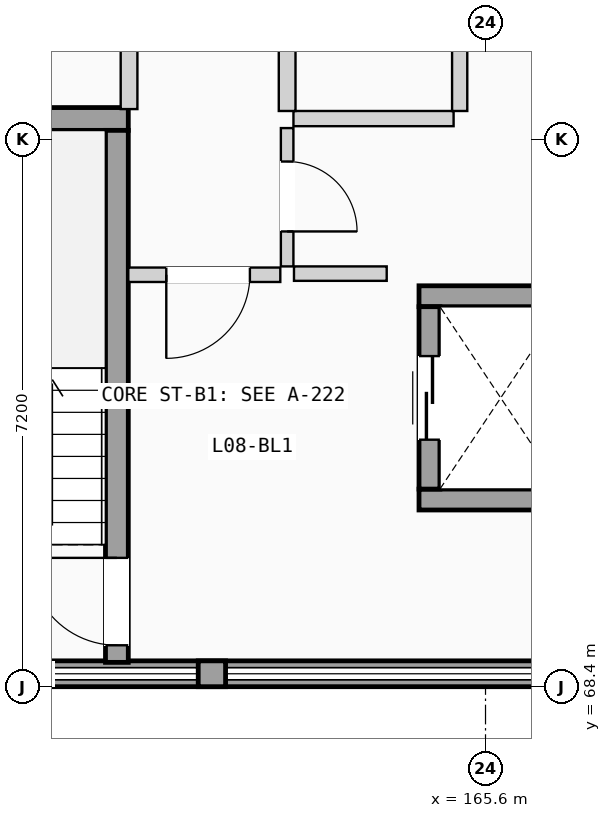
"""IFC4 building model, lengths in metres.
Left out: names, types, materials, properties, quantities, classifications, styles, units other than length and angle.
Written with IfcOpenShell. Run it as: python <this file> out.ifc"""

import sys

from ifc_helpers import new_model, si_unit, direction, frame, frame_2d, origin, place, context, subcontext, project, spatial, rectangle, extrude, element, fill, save


model = new_model("IFC4")
c1 = context("Model", 3, precision=1e-05, world=origin(), true_north=direction((0.0, 1.0)))
c2 = subcontext(c1, "Body", "Model", "MODEL_VIEW")
j1 = project(units=[si_unit("LENGTHUNIT", "METRE"), si_unit("PLANEANGLEUNIT", "RADIAN")], contexts=[c1])
p1 = place(None, origin())
s1 = spatial("IfcSite", under=j1, at=p1, CompositionType="ELEMENT")
p2 = place(p1, origin())
s2 = spatial("IfcBuilding", under=s1, at=p2, CompositionType="ELEMENT")
p3 = place(p2, frame((0.0, 0.0, 27.825)))
s3 = spatial("IfcBuildingStorey", under=s2, at=p3, CompositionType="ELEMENT", Elevation=27.825)
p4 = place(p3, frame((151.2, 68.57, 0.0), z_axis=(0.0, 0.0, 1.0), x_axis=(1.0, 0.0, 0.0)))
e1 = element("IfcWall", 1, at=p4, inside=s3, PredefinedType="SOLIDWALL", context=c2, shape_type="SweptSolid", body=[
    extrude(rectangle(XDim=21.6, YDim=0.34, at=frame_2d((10.8, 0.0))), origin(), (0.0, 0.0, 1.0), 1.11),
])
p5 = place(p3, frame((161.82, 68.57, 1.11), z_axis=(0.0, 0.0, 1.0), x_axis=(1.0, 0.0, 0.0)))
e2 = element("IfcWall", 2, at=p5, inside=s3, PredefinedType="SOLIDWALL", context=c2, shape_type="SweptSolid", body=[
    extrude(rectangle(XDim=0.36, YDim=0.34, at=frame_2d((0.18, 0.0))), origin(), (0.0, 0.0, 1.0), 1.78),
])
p6 = place(p3, frame((156.9, 75.87, 0.0), z_axis=(0.0, 0.0, 1.0), x_axis=(1.0, 0.0, 0.0)))
e3 = element("IfcWall", 3, at=p6, inside=s3, PredefinedType="SHEAR", context=c2, shape_type="SweptSolid", body=[
    extrude(rectangle(XDim=4.0, YDim=0.3, at=frame_2d((2.0, 0.0))), origin(), (0.0, 0.0, 1.0), 2.89),
])
p7 = place(p3, frame((160.75, 68.72, 0.0), z_axis=(0.0, 0.0, 1.0), x_axis=(0.0, 1.0, 0.0)))
e4 = element("IfcWall", 4, at=p7, inside=s3, PredefinedType="SHEAR", context=c2, shape_type="SweptSolid", body=[
    extrude(rectangle(XDim=7.0, YDim=0.3, at=frame_2d((3.5, 0.0))), origin(), (0.0, 0.0, 1.0), 2.89),
])
p8 = place(p7, frame((0.225, 0.0, 0.0)))
e5 = element("IfcOpeningElement", 5, at=p8, cuts=e4, PredefinedType="OPENING", context=c2, shape_type="SweptSolid", body=[
    extrude(rectangle(XDim=1.15, YDim=2.12, at=frame_2d((0.575, 1.06))), frame((0.0, 0.16, 0.0), z_axis=(0.0, -1.0, 0.0), x_axis=(1.0, 0.0, 0.0)), (0.0, 0.0, 1.0), 0.32),
])
for number, where, z_axis, x_axis in (
    (6, (164.725, 70.863, 0.0), (0.0, 0.0, 1.0), (1.0, 0.0, 0.0)),
    (7, (164.725, 73.538, 0.0), (0.0, 0.0, 1.0), (1.0, 0.0, 0.0)),
):
    element("IfcWall", number, at=place(p3, frame(where, z_axis=z_axis, x_axis=x_axis)), inside=s3, PredefinedType="SHEAR", context=c2, shape_type="SweptSolid", body=[
        extrude(rectangle(XDim=2.15, YDim=0.275, at=frame_2d((1.075, 0.0))), origin(), (0.0, 0.0, 1.0), 2.89),
    ])
p9 = place(p3, frame((164.863, 71.0, 0.0), z_axis=(0.0, 0.0, 1.0), x_axis=(0.0, 1.0, 0.0)))
e8 = element("IfcWall", 8, at=p9, inside=s3, PredefinedType="SHEAR", context=c2, shape_type="SweptSolid", body=[
    extrude(rectangle(XDim=2.4, YDim=0.275, at=frame_2d((1.2, 0.0))), origin(), (0.0, 0.0, 1.0), 2.89),
])
p10 = place(p9, frame((0.65, 0.0, 0.0)))
e9 = element("IfcOpeningElement", 9, at=p10, cuts=e8, PredefinedType="OPENING", context=c2, shape_type="SweptSolid", body=[
    extrude(rectangle(XDim=1.1, YDim=2.15, at=frame_2d((0.55, 1.075))), frame((0.0, 0.147, 0.0), z_axis=(0.0, -1.0, 0.0), x_axis=(1.0, 0.0, 0.0)), (0.0, 0.0, 1.0), 0.295),
])
p11 = place(p3, frame((163.08, 73.835, 0.0), z_axis=(0.0, 0.0, 1.0), x_axis=(1.0, 0.0, 0.0)))
e10 = element("IfcWall", 10, at=p11, inside=s3, PredefinedType="PARTITIONING", context=c2, shape_type="SweptSolid", body=[
    extrude(rectangle(XDim=1.22, YDim=0.19, at=frame_2d((0.61, 0.0))), origin(), (0.0, 0.0, 1.0), 2.87),
])
p12 = place(p3, frame((160.9, 73.82, 0.0), z_axis=(0.0, 0.0, 1.0), x_axis=(1.0, 0.0, 0.0)))
e11 = element("IfcWall", 11, at=p12, inside=s3, PredefinedType="PARTITIONING", context=c2, shape_type="SweptSolid", body=[
    extrude(rectangle(XDim=2.0, YDim=0.19, at=frame_2d((1.0, 0.0))), origin(), (0.0, 0.0, 1.0), 2.87),
])
p13 = place(p12, frame((0.5, 0.0, 0.0)))
e12 = element("IfcOpeningElement", 12, at=p13, cuts=e11, PredefinedType="OPENING", context=c2, shape_type="SweptSolid", body=[
    extrude(rectangle(XDim=1.1, YDim=2.12, at=frame_2d((0.55, 1.06))), frame((0.0, 0.105, 0.0), z_axis=(0.0, -1.0, 0.0), x_axis=(1.0, 0.0, 0.0)), (0.0, 0.0, 1.0), 0.21),
])
p14 = place(p3, frame((162.99, 73.93, 0.0), z_axis=(0.0, 0.0, 1.0), x_axis=(0.0, 1.0, 0.0)))
e13 = element("IfcWall", 13, at=p14, inside=s3, PredefinedType="PARTITIONING", context=c2, shape_type="SweptSolid", body=[
    extrude(rectangle(XDim=1.82, YDim=0.165, at=frame_2d((0.91, 0.0))), origin(), (0.0, 0.0, 1.0), 2.87),
])
p15 = place(p14, frame((0.46, 0.0, 0.0)))
e14 = element("IfcOpeningElement", 14, at=p15, cuts=e13, PredefinedType="OPENING", context=c2, shape_type="SweptSolid", body=[
    extrude(rectangle(XDim=0.92, YDim=2.04, at=frame_2d((0.46, 1.02))), frame((0.0, 0.093, 0.0), z_axis=(0.0, -1.0, 0.0), x_axis=(1.0, 0.0, 0.0)), (0.0, 0.0, 1.0), 0.185),
])
p16 = place(p3, frame((163.073, 75.875, 0.0), z_axis=(0.0, 0.0, 1.0), x_axis=(1.0, 0.0, 0.0)))
e15 = element("IfcWall", 15, at=p16, inside=s3, PredefinedType="PLUMBINGWALL", context=c2, shape_type="SweptSolid", body=[
    extrude(rectangle(XDim=2.107, YDim=0.2, at=frame_2d((1.053, 0.0))), origin(), (0.0, 0.0, 1.0), 2.87),
])
p17 = place(p3, frame((160.91, 76.0, 0.0), z_axis=(0.0, 0.0, 1.0), x_axis=(0.0, 1.0, 0.0)))
e16 = element("IfcWall", 16, at=p17, inside=s3, PredefinedType="PLUMBINGWALL", context=c2, shape_type="SweptSolid", body=[
    extrude(rectangle(XDim=5.785, YDim=0.22, at=frame_2d((2.893, 0.0))), origin(), (0.0, 0.0, 1.0), 2.87),
])
p18 = place(p3, frame((162.99, 75.975, 0.0), z_axis=(0.0, 0.0, 1.0), x_axis=(0.0, 1.0, 0.0)))
e17 = element("IfcWall", 17, at=p18, inside=s3, PredefinedType="PLUMBINGWALL", context=c2, shape_type="SweptSolid", body=[
    extrude(rectangle(XDim=5.81, YDim=0.22, at=frame_2d((2.905, 0.0))), origin(), (0.0, 0.0, 1.0), 2.87),
])
p19 = place(p3, frame((165.26, 75.975, 0.0), z_axis=(0.0, 0.0, 1.0), x_axis=(0.0, 1.0, 0.0)))
e18 = element("IfcWall", 18, at=p19, inside=s3, PredefinedType="PLUMBINGWALL", context=c2, shape_type="SweptSolid", body=[
    extrude(rectangle(XDim=5.83, YDim=0.2, at=frame_2d((2.915, 0.0))), origin(), (0.0, 0.0, 1.0), 2.87),
])
p20 = place(p19, frame((2.493, 0.0, 0.0)))
e19 = element("IfcOpeningElement", 19, at=p20, cuts=e18, PredefinedType="OPENING", context=c2, shape_type="SweptSolid", body=[
    extrude(rectangle(XDim=0.85, YDim=2.01, at=frame_2d((0.425, 1.005))), frame((0.0, 0.11, 0.0), z_axis=(0.0, -1.0, 0.0), x_axis=(1.0, 0.0, 0.0)), (0.0, 0.0, 1.0), 0.22),
])
p21 = place(p8, origin())
e20 = element("IfcDoor", 20, at=p21, inside=s3, OperationType="SINGLE_SWING_RIGHT", PredefinedType="DOOR", context=c2, shape_type="SweptSolid", body=[
    extrude(rectangle(XDim=1.15, YDim=2.12, at=frame_2d((0.575, 1.06))), frame((0.0, 0.025, 0.0), z_axis=(0.0, -1.0, 0.0), x_axis=(1.0, 0.0, 0.0)), (0.0, 0.0, 1.0), 0.05),
])
fill(e5, e20)
p22 = place(p10, origin())
e21 = element("IfcDoor", 21, at=p22, inside=s3, OperationType="SLIDING_TO_LEFT", PredefinedType="DOOR", context=c2, shape_type="SweptSolid", body=[
    extrude(rectangle(XDim=1.1, YDim=2.15, at=frame_2d((0.55, 1.075))), frame((0.0, 0.025, 0.0), z_axis=(0.0, -1.0, 0.0), x_axis=(1.0, 0.0, 0.0)), (0.0, 0.0, 1.0), 0.05),
])
fill(e9, e21)
p23 = place(p13, frame((1.1, 0.0, 0.0), z_axis=(0.0, 0.0, 1.0), x_axis=(-1.0, 0.0, 0.0)))
e22 = element("IfcDoor", 22, at=p23, inside=s3, OperationType="SINGLE_SWING_LEFT", PredefinedType="DOOR", context=c2, shape_type="SweptSolid", body=[
    extrude(rectangle(XDim=1.1, YDim=2.12, at=frame_2d((0.55, 1.06))), frame((0.0, 0.025, 0.0), z_axis=(0.0, -1.0, 0.0), x_axis=(1.0, 0.0, 0.0)), (0.0, 0.0, 1.0), 0.05),
])
fill(e12, e22)
p24 = place(p15, frame((0.92, 0.0, 0.0), z_axis=(0.0, 0.0, 1.0), x_axis=(-1.0, 0.0, 0.0)))
e23 = element("IfcDoor", 23, at=p24, inside=s3, OperationType="SINGLE_SWING_LEFT", PredefinedType="DOOR", context=c2, shape_type="SweptSolid", body=[
    extrude(rectangle(XDim=0.92, YDim=2.04, at=frame_2d((0.46, 1.02))), frame((0.0, 0.025, 0.0), z_axis=(0.0, -1.0, 0.0), x_axis=(1.0, 0.0, 0.0)), (0.0, 0.0, 1.0), 0.05),
])
fill(e14, e23)
save(model, sys.argv[1])
